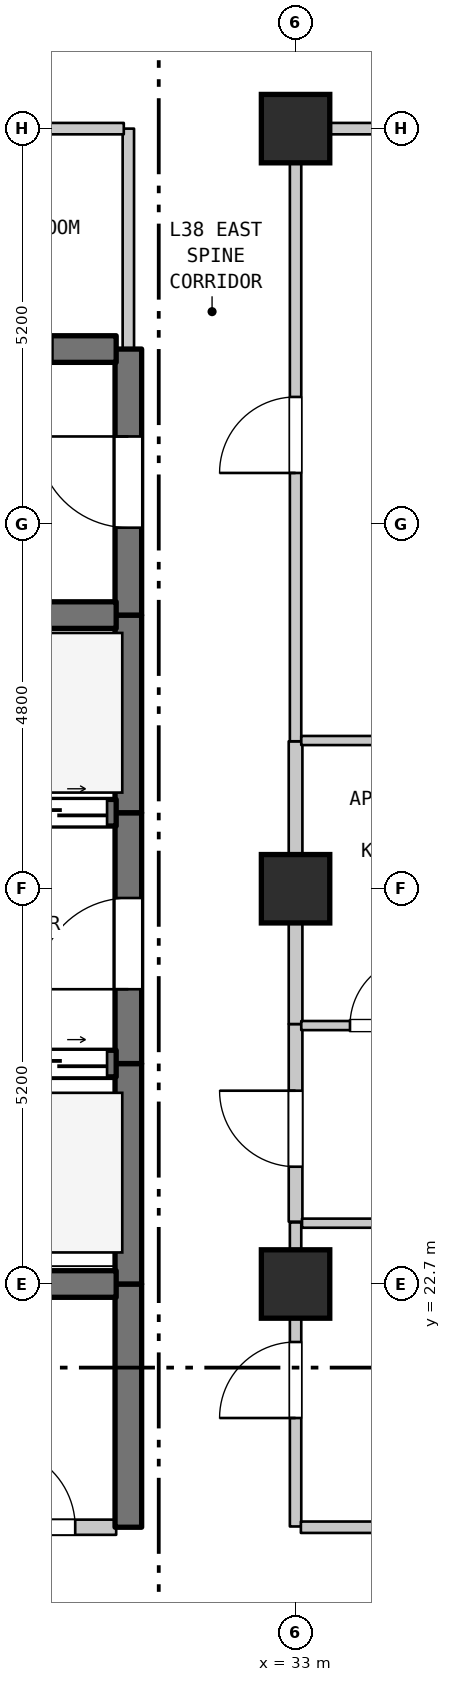
"""IFC4 building model, lengths in metres.
Left out: names, types, materials, properties, quantities, classifications, styles, units other than length and angle.
Written with IfcOpenShell. Run it as: python <this file> out.ifc"""

import sys

from ifc_helpers import new_model, si_unit, direction, frame, frame_2d, origin, origin_2d, place, context, subcontext, project, spatial, rectangle, extrude, element, fill, save


model = new_model("IFC4")
c1 = context("Model", 3, precision=1e-05, world=origin(), true_north=direction((0.0, 1.0)))
c2 = subcontext(c1, "Body", "Model", "MODEL_VIEW")
j1 = project(units=[si_unit("LENGTHUNIT", "METRE"), si_unit("PLANEANGLEUNIT", "RADIAN")], contexts=[c1])
p1 = place(None, origin())
s1 = spatial("IfcSite", under=j1, at=p1, CompositionType="ELEMENT")
p2 = place(p1, origin())
s2 = spatial("IfcBuilding", under=s1, at=p2, CompositionType="ELEMENT")
p3 = place(p2, frame((0.0, 0.0, 155.7)))
s3 = spatial("IfcBuildingStorey", under=s2, at=p3, CompositionType="ELEMENT", Elevation=155.7)
for number, where, z_axis, x_axis in (
    (1, (33.0, 22.7, 0.0), (0.0, 0.0, 1.0), (1.0, 0.0, 0.0)),
    (2, (33.0, 27.9, 0.0), (0.0, 0.0, 1.0), (1.0, 0.0, 0.0)),
    (3, (33.0, 37.9, 0.0), (0.0, 0.0, 1.0), (1.0, 0.0, 0.0)),
):
    element("IfcColumn", number, at=place(p3, frame(where, z_axis=z_axis, x_axis=x_axis)), inside=s3, PredefinedType="COLUMN", context=c2, shape_type="SweptSolid", body=[
        extrude(rectangle(XDim=0.9, YDim=0.9, at=origin_2d()), origin(), (0.0, 0.0, 1.0), 3.7),
    ])
p4 = place(p3, frame((30.8, 19.5, 0.0), z_axis=(0.0, 0.0, 1.0), x_axis=(0.0, 1.0, 0.0)))
e4 = element("IfcWall", 4, at=p4, inside=s3, PredefinedType="SHEAR", context=c2, shape_type="SweptSolid", body=[
    extrude(rectangle(XDim=3.2, YDim=0.35, at=frame_2d((1.6, 0.0))), origin(), (0.0, 0.0, 1.0), 3.28),
])
p5 = place(p3, frame((30.8, 22.7, 0.0), z_axis=(0.0, 0.0, 1.0), x_axis=(0.0, 1.0, 0.0)))
e5 = element("IfcWall", 5, at=p5, inside=s3, PredefinedType="SHEAR", context=c2, shape_type="SweptSolid", body=[
    extrude(rectangle(XDim=2.9, YDim=0.35, at=frame_2d((1.45, 0.0))), origin(), (0.0, 0.0, 1.0), 3.28),
])
p6 = place(p3, frame((30.8, 25.6, 0.0), z_axis=(0.0, 0.0, 1.0), x_axis=(0.0, 1.0, 0.0)))
e6 = element("IfcWall", 6, at=p6, inside=s3, PredefinedType="SHEAR", context=c2, shape_type="SweptSolid", body=[
    extrude(rectangle(XDim=3.3, YDim=0.35, at=frame_2d((1.65, 0.0))), origin(), (0.0, 0.0, 1.0), 3.28),
])
p7 = place(p6, frame((0.978, 0.0, 0.0)))
e7 = element("IfcOpeningElement", 7, at=p7, cuts=e6, PredefinedType="OPENING", context=c2, shape_type="SweptSolid", body=[
    extrude(rectangle(XDim=1.2, YDim=2.2, at=frame_2d((0.6, 1.1))), frame((0.0, 0.185, 0.0), z_axis=(0.0, -1.0, 0.0), x_axis=(1.0, 0.0, 0.0)), (0.0, 0.0, 1.0), 0.37),
])
p8 = place(p3, frame((30.8, 28.9, 0.0), z_axis=(0.0, 0.0, 1.0), x_axis=(0.0, 1.0, 0.0)))
e8 = element("IfcWall", 8, at=p8, inside=s3, PredefinedType="SHEAR", context=c2, shape_type="SweptSolid", body=[
    extrude(rectangle(XDim=2.6, YDim=0.35, at=frame_2d((1.3, 0.0))), origin(), (0.0, 0.0, 1.0), 3.28),
])
p9 = place(p3, frame((30.8, 31.5, 0.0), z_axis=(0.0, 0.0, 1.0), x_axis=(0.0, 1.0, 0.0)))
e9 = element("IfcWall", 9, at=p9, inside=s3, PredefinedType="SHEAR", context=c2, shape_type="SweptSolid", body=[
    extrude(rectangle(XDim=3.5, YDim=0.35, at=frame_2d((1.75, 0.0))), origin(), (0.0, 0.0, 1.0), 3.28),
])
p10 = place(p9, frame((1.15, 0.0, 0.0)))
e10 = element("IfcOpeningElement", 10, at=p10, cuts=e9, PredefinedType="OPENING", context=c2, shape_type="SweptSolid", body=[
    extrude(rectangle(XDim=1.2, YDim=2.2, at=frame_2d((0.6, 1.1))), frame((0.0, 0.185, 0.0), z_axis=(0.0, -1.0, 0.0), x_axis=(1.0, 0.0, 0.0)), (0.0, 0.0, 1.0), 0.37),
])
p11 = place(p3, frame((30.8, 35.0, 0.0), z_axis=(0.0, 0.0, 1.0), x_axis=(0.0, 1.0, 0.0)))
e11 = element("IfcWall", 11, at=p11, inside=s3, PredefinedType="STANDARD", context=c2, shape_type="SweptSolid", body=[
    extrude(rectangle(XDim=2.9, YDim=0.15, at=frame_2d((1.45, 0.0))), origin(), (0.0, 0.0, 1.0), 3.28),
])
p12 = place(p3, frame((33.0, 19.51, 0.0), z_axis=(0.0, 0.0, 1.0), x_axis=(0.0, 1.0, 0.0)))
e12 = element("IfcWall", 12, at=p12, inside=s3, PredefinedType="STANDARD", context=c2, shape_type="SweptSolid", body=[
    extrude(rectangle(XDim=4.0, YDim=0.15, at=frame_2d((2.0, 0.0))), origin(), (0.0, 0.0, 1.0), 2.78),
])
p13 = place(p12, frame((1.427, 0.0, 0.0)))
e13 = element("IfcOpeningElement", 13, at=p13, cuts=e12, PredefinedType="OPENING", context=c2, shape_type="SweptSolid", body=[
    extrude(rectangle(XDim=1.0, YDim=2.15, at=frame_2d((0.5, 1.075))), frame((0.0, 0.085, 0.0), z_axis=(0.0, -1.0, 0.0), x_axis=(1.0, 0.0, 0.0)), (0.0, 0.0, 1.0), 0.17),
])
p14 = place(p3, frame((33.0, 23.52, 0.0), z_axis=(0.0, 0.0, 1.0), x_axis=(0.0, 1.0, 0.0)))
e14 = element("IfcWall", 14, at=p14, inside=s3, PredefinedType="STANDARD", context=c2, shape_type="SweptSolid", body=[
    extrude(rectangle(XDim=2.6, YDim=0.18, at=frame_2d((1.3, 0.0))), origin(), (0.0, 0.0, 1.0), 2.78),
])
p15 = place(p14, frame((0.723, 0.0, 0.0)))
e15 = element("IfcOpeningElement", 15, at=p15, cuts=e14, PredefinedType="OPENING", context=c2, shape_type="SweptSolid", body=[
    extrude(rectangle(XDim=1.0, YDim=2.15, at=frame_2d((0.5, 1.075))), frame((0.0, 0.1, 0.0), z_axis=(0.0, -1.0, 0.0), x_axis=(1.0, 0.0, 0.0)), (0.0, 0.0, 1.0), 0.2),
])
p16 = place(p3, frame((33.0, 26.12, 0.0), z_axis=(0.0, 0.0, 1.0), x_axis=(0.0, 1.0, 0.0)))
e16 = element("IfcWall", 16, at=p16, inside=s3, PredefinedType="STANDARD", context=c2, shape_type="SweptSolid", body=[
    extrude(rectangle(XDim=3.72, YDim=0.18, at=frame_2d((1.86, 0.0))), origin(), (0.0, 0.0, 1.0), 2.78),
])
p17 = place(p3, frame((33.0, 29.84, 0.0), z_axis=(0.0, 0.0, 1.0), x_axis=(0.0, 1.0, 0.0)))
e17 = element("IfcWall", 17, at=p17, inside=s3, PredefinedType="STANDARD", context=c2, shape_type="SweptSolid", body=[
    extrude(rectangle(XDim=8.06, YDim=0.15, at=frame_2d((4.03, 0.0))), origin(), (0.0, 0.0, 1.0), 2.78),
])
p18 = place(p17, frame((3.53, 0.0, 0.0)))
e18 = element("IfcOpeningElement", 18, at=p18, cuts=e17, PredefinedType="OPENING", context=c2, shape_type="SweptSolid", body=[
    extrude(rectangle(XDim=1.0, YDim=2.15, at=frame_2d((0.5, 1.075))), frame((0.0, 0.085, 0.0), z_axis=(0.0, -1.0, 0.0), x_axis=(1.0, 0.0, 0.0)), (0.0, 0.0, 1.0), 0.17),
])
p19 = place(p3, frame((28.585, 19.5, 0.0), z_axis=(0.0, 0.0, 1.0), x_axis=(1.0, 0.0, 0.0)))
e19 = element("IfcWall", 19, at=p19, inside=s3, PredefinedType="STANDARD", context=c2, shape_type="SweptSolid", body=[
    extrude(rectangle(XDim=2.055, YDim=0.2, at=frame_2d((1.027, 0.0))), origin(), (0.0, 0.0, 1.0), 3.28),
])
p20 = place(p19, frame((0.466, 0.0, 0.0)))
e20 = element("IfcOpeningElement", 20, at=p20, cuts=e19, PredefinedType="OPENING", context=c2, shape_type="SweptSolid", body=[
    extrude(rectangle(XDim=1.05, YDim=2.15, at=frame_2d((0.525, 1.075))), frame((0.0, 0.11, 0.0), z_axis=(0.0, -1.0, 0.0), x_axis=(1.0, 0.0, 0.0)), (0.0, 0.0, 1.0), 0.22),
])
p21 = place(p3, frame((33.07, 19.5, 0.0), z_axis=(0.0, 0.0, 1.0), x_axis=(1.0, 0.0, 0.0)))
e21 = element("IfcWall", 21, at=p21, inside=s3, PredefinedType="STANDARD", context=c2, shape_type="SweptSolid", body=[
    extrude(rectangle(XDim=21.51, YDim=0.15, at=frame_2d((10.755, 0.0))), origin(), (0.0, 0.0, 1.0), 3.28),
])
p22 = place(p21, frame((10.185, 0.0, 0.0)))
e22 = element("IfcOpeningElement", 22, at=p22, cuts=e21, PredefinedType="OPENING", context=c2, shape_type="SweptSolid", body=[
    extrude(rectangle(XDim=1.0, YDim=2.15, at=frame_2d((0.5, 1.075))), frame((0.0, 0.085, 0.0), z_axis=(0.0, -1.0, 0.0), x_axis=(1.0, 0.0, 0.0)), (0.0, 0.0, 1.0), 0.17),
])
p23 = place(p3, frame((28.585, 22.7, 0.0), z_axis=(0.0, 0.0, 1.0), x_axis=(1.0, 0.0, 0.0)))
e23 = element("IfcWall", 23, at=p23, inside=s3, PredefinedType="SHEAR", context=c2, shape_type="SweptSolid", body=[
    extrude(rectangle(XDim=2.055, YDim=0.35, at=frame_2d((1.027, 0.0))), origin(), (0.0, 0.0, 1.0), 3.28),
])
p24 = place(p3, frame((33.085, 23.5, 0.0), z_axis=(0.0, 0.0, 1.0), x_axis=(1.0, 0.0, 0.0)))
e24 = element("IfcWall", 24, at=p24, inside=s3, PredefinedType="PARTITIONING", context=c2, shape_type="SweptSolid", body=[
    extrude(rectangle(XDim=23.905, YDim=0.12, at=frame_2d((11.953, 0.0))), origin(), (0.0, 0.0, 1.0), 3.28),
])
p25 = place(p3, frame((27.46, 25.6, 0.0), z_axis=(0.0, 0.0, 1.0), x_axis=(1.0, 0.0, 0.0)))
e25 = element("IfcWall", 25, at=p25, inside=s3, PredefinedType="SHEAR", context=c2, shape_type="SweptSolid", body=[
    extrude(rectangle(XDim=3.18, YDim=0.35, at=frame_2d((1.59, 0.0))), origin(), (0.0, 0.0, 1.0), 3.28),
])
p26 = place(p25, frame((0.12, 0.0, 0.0)))
e26 = element("IfcOpeningElement", 26, at=p26, cuts=e25, PredefinedType="OPENING", context=c2, shape_type="SweptSolid", body=[
    extrude(rectangle(XDim=1.25, YDim=2.2, at=frame_2d((0.625, 1.1))), frame((0.0, 0.185, 0.0), z_axis=(0.0, -1.0, 0.0), x_axis=(1.0, 0.0, 0.0)), (0.0, 0.0, 1.0), 0.37),
])
p27 = place(p25, frame((1.81, 0.0, 0.0)))
e27 = element("IfcOpeningElement", 27, at=p27, cuts=e25, PredefinedType="OPENING", context=c2, shape_type="SweptSolid", body=[
    extrude(rectangle(XDim=1.25, YDim=2.2, at=frame_2d((0.625, 1.1))), frame((0.0, 0.185, 0.0), z_axis=(0.0, -1.0, 0.0), x_axis=(1.0, 0.0, 0.0)), (0.0, 0.0, 1.0), 0.37),
])
p28 = place(p3, frame((33.075, 26.1, 0.0), z_axis=(0.0, 0.0, 1.0), x_axis=(1.0, 0.0, 0.0)))
e28 = element("IfcWall", 28, at=p28, inside=s3, PredefinedType="PARTITIONING", context=c2, shape_type="SweptSolid", body=[
    extrude(rectangle(XDim=2.364, YDim=0.12, at=frame_2d((1.182, 0.0))), origin(), (0.0, 0.0, 1.0), 3.28),
])
p29 = place(p28, frame((0.641, 0.0, 0.0)))
e29 = element("IfcOpeningElement", 29, at=p29, cuts=e28, PredefinedType="OPENING", context=c2, shape_type="SweptSolid", body=[
    extrude(rectangle(XDim=0.9, YDim=2.15, at=frame_2d((0.45, 1.075))), frame((0.0, 0.07, 0.0), z_axis=(0.0, -1.0, 0.0), x_axis=(1.0, 0.0, 0.0)), (0.0, 0.0, 1.0), 0.14),
])
p30 = place(p3, frame((27.46, 28.9, 0.0), z_axis=(0.0, 0.0, 1.0), x_axis=(1.0, 0.0, 0.0)))
e30 = element("IfcWall", 30, at=p30, inside=s3, PredefinedType="SHEAR", context=c2, shape_type="SweptSolid", body=[
    extrude(rectangle(XDim=3.18, YDim=0.35, at=frame_2d((1.59, 0.0))), origin(), (0.0, 0.0, 1.0), 3.28),
])
p31 = place(p30, frame((0.12, 0.0, 0.0)))
e31 = element("IfcOpeningElement", 31, at=p31, cuts=e30, PredefinedType="OPENING", context=c2, shape_type="SweptSolid", body=[
    extrude(rectangle(XDim=1.25, YDim=2.2, at=frame_2d((0.625, 1.1))), frame((0.0, 0.185, 0.0), z_axis=(0.0, -1.0, 0.0), x_axis=(1.0, 0.0, 0.0)), (0.0, 0.0, 1.0), 0.37),
])
p32 = place(p30, frame((1.81, 0.0, 0.0)))
e32 = element("IfcOpeningElement", 32, at=p32, cuts=e30, PredefinedType="OPENING", context=c2, shape_type="SweptSolid", body=[
    extrude(rectangle(XDim=1.25, YDim=2.2, at=frame_2d((0.625, 1.1))), frame((0.0, 0.185, 0.0), z_axis=(0.0, -1.0, 0.0), x_axis=(1.0, 0.0, 0.0)), (0.0, 0.0, 1.0), 0.37),
])
p33 = place(p3, frame((33.075, 29.85, 0.0), z_axis=(0.0, 0.0, 1.0), x_axis=(1.0, 0.0, 0.0)))
e33 = element("IfcWall", 33, at=p33, inside=s3, PredefinedType="PARTITIONING", context=c2, shape_type="SweptSolid", body=[
    extrude(rectangle(XDim=2.364, YDim=0.12, at=frame_2d((1.182, 0.0))), origin(), (0.0, 0.0, 1.0), 3.28),
])
p34 = place(p3, frame((27.46, 31.5, 0.0), z_axis=(0.0, 0.0, 1.0), x_axis=(1.0, 0.0, 0.0)))
e34 = element("IfcWall", 34, at=p34, inside=s3, PredefinedType="SHEAR", context=c2, shape_type="SweptSolid", body=[
    extrude(rectangle(XDim=3.18, YDim=0.35, at=frame_2d((1.59, 0.0))), origin(), (0.0, 0.0, 1.0), 3.28),
])
p35 = place(p3, frame((28.045, 35.0, 0.0), z_axis=(0.0, 0.0, 1.0), x_axis=(1.0, 0.0, 0.0)))
e35 = element("IfcWall", 35, at=p35, inside=s3, PredefinedType="SHEAR", context=c2, shape_type="SweptSolid", body=[
    extrude(rectangle(XDim=2.595, YDim=0.35, at=frame_2d((1.297, 0.0))), origin(), (0.0, 0.0, 1.0), 3.28),
])
p36 = place(p35, frame((0.806, 0.0, 0.0)))
e36 = element("IfcOpeningElement", 36, at=p36, cuts=e35, PredefinedType="OPENING", context=c2, shape_type="SweptSolid", body=[
    extrude(rectangle(XDim=0.95, YDim=2.15, at=frame_2d((0.475, 1.075))), frame((0.0, 0.185, 0.0), z_axis=(0.0, -1.0, 0.0), x_axis=(1.0, 0.0, 0.0)), (0.0, 0.0, 1.0), 0.37),
])
p37 = place(p3, frame((28.045, 37.9, 0.0), z_axis=(0.0, 0.0, 1.0), x_axis=(1.0, 0.0, 0.0)))
e37 = element("IfcWall", 37, at=p37, inside=s3, PredefinedType="STANDARD", context=c2, shape_type="SweptSolid", body=[
    extrude(rectangle(XDim=2.695, YDim=0.15, at=frame_2d((1.348, 0.0))), origin(), (0.0, 0.0, 1.0), 2.68),
])
p38 = place(p3, frame((33.06, 37.9, 0.0), z_axis=(0.0, 0.0, 1.0), x_axis=(1.0, 0.0, 0.0)))
e38 = element("IfcWall", 38, at=p38, inside=s3, PredefinedType="STANDARD", context=c2, shape_type="SweptSolid", body=[
    extrude(rectangle(XDim=11.879, YDim=0.15, at=frame_2d((5.939, 0.0))), origin(), (0.0, 0.0, 1.0), 3.28),
])
p39 = place(p38, frame((5.439, 0.0, 0.0)))
e39 = element("IfcOpeningElement", 39, at=p39, cuts=e38, PredefinedType="OPENING", context=c2, shape_type="SweptSolid", body=[
    extrude(rectangle(XDim=1.0, YDim=2.15, at=frame_2d((0.5, 1.075))), frame((0.0, 0.085, 0.0), z_axis=(0.0, -1.0, 0.0), x_axis=(1.0, 0.0, 0.0)), (0.0, 0.0, 1.0), 0.17),
])
p40 = place(p7, origin())
e40 = element("IfcDoor", 40, at=p40, inside=s3, OperationType="SINGLE_SWING_LEFT", PredefinedType="DOOR", context=c2, shape_type="SweptSolid", body=[
    extrude(rectangle(XDim=1.2, YDim=2.2, at=frame_2d((0.6, 1.1))), frame((0.0, 0.025, 0.0), z_axis=(0.0, -1.0, 0.0), x_axis=(1.0, 0.0, 0.0)), (0.0, 0.0, 1.0), 0.05),
])
fill(e7, e40)
p41 = place(p10, origin())
e41 = element("IfcDoor", 41, at=p41, inside=s3, OperationType="SINGLE_SWING_RIGHT", PredefinedType="DOOR", context=c2, shape_type="SweptSolid", body=[
    extrude(rectangle(XDim=1.2, YDim=2.2, at=frame_2d((0.6, 1.1))), frame((0.0, 0.025, 0.0), z_axis=(0.0, -1.0, 0.0), x_axis=(1.0, 0.0, 0.0)), (0.0, 0.0, 1.0), 0.05),
])
fill(e10, e41)
p42 = place(p13, origin())
e42 = element("IfcDoor", 42, at=p42, inside=s3, OperationType="SINGLE_SWING_LEFT", PredefinedType="DOOR", context=c2, shape_type="SweptSolid", body=[
    extrude(rectangle(XDim=1.0, YDim=2.15, at=frame_2d((0.5, 1.075))), frame((0.0, 0.025, 0.0), z_axis=(0.0, -1.0, 0.0), x_axis=(1.0, 0.0, 0.0)), (0.0, 0.0, 1.0), 0.05),
])
fill(e13, e42)
p43 = place(p15, origin())
e43 = element("IfcDoor", 43, at=p43, inside=s3, OperationType="SINGLE_SWING_RIGHT", PredefinedType="DOOR", context=c2, shape_type="SweptSolid", body=[
    extrude(rectangle(XDim=1.0, YDim=2.15, at=frame_2d((0.5, 1.075))), frame((0.0, 0.025, 0.0), z_axis=(0.0, -1.0, 0.0), x_axis=(1.0, 0.0, 0.0)), (0.0, 0.0, 1.0), 0.05),
])
fill(e15, e43)
p44 = place(p18, origin())
e44 = element("IfcDoor", 44, at=p44, inside=s3, OperationType="SINGLE_SWING_LEFT", PredefinedType="DOOR", context=c2, shape_type="SweptSolid", body=[
    extrude(rectangle(XDim=1.0, YDim=2.15, at=frame_2d((0.5, 1.075))), frame((0.0, 0.025, 0.0), z_axis=(0.0, -1.0, 0.0), x_axis=(1.0, 0.0, 0.0)), (0.0, 0.0, 1.0), 0.05),
])
fill(e18, e44)
p45 = place(p20, origin())
e45 = element("IfcDoor", 45, at=p45, inside=s3, OperationType="SINGLE_SWING_LEFT", PredefinedType="DOOR", context=c2, shape_type="SweptSolid", body=[
    extrude(rectangle(XDim=1.05, YDim=2.15, at=frame_2d((0.525, 1.075))), frame((0.0, 0.025, 0.0), z_axis=(0.0, -1.0, 0.0), x_axis=(1.0, 0.0, 0.0)), (0.0, 0.0, 1.0), 0.05),
])
fill(e20, e45)
p46 = place(p27, origin())
e46 = element("IfcDoor", 46, at=p46, inside=s3, OperationType="DOUBLE_DOOR_SLIDING", PredefinedType="DOOR", context=c2, shape_type="SweptSolid", body=[
    extrude(rectangle(XDim=1.25, YDim=2.2, at=frame_2d((0.625, 1.1))), frame((0.0, 0.025, 0.0), z_axis=(0.0, -1.0, 0.0), x_axis=(1.0, 0.0, 0.0)), (0.0, 0.0, 1.0), 0.05),
])
fill(e27, e46)
p47 = place(p29, origin())
e47 = element("IfcDoor", 47, at=p47, inside=s3, OperationType="SINGLE_SWING_RIGHT", PredefinedType="DOOR", context=c2, shape_type="SweptSolid", body=[
    extrude(rectangle(XDim=0.9, YDim=2.15, at=frame_2d((0.45, 1.075))), frame((0.0, 0.025, 0.0), z_axis=(0.0, -1.0, 0.0), x_axis=(1.0, 0.0, 0.0)), (0.0, 0.0, 1.0), 0.05),
])
fill(e29, e47)
p48 = place(p32, origin())
e48 = element("IfcDoor", 48, at=p48, inside=s3, OperationType="DOUBLE_DOOR_SLIDING", PredefinedType="DOOR", context=c2, shape_type="SweptSolid", body=[
    extrude(rectangle(XDim=1.25, YDim=2.2, at=frame_2d((0.625, 1.1))), frame((0.0, 0.025, 0.0), z_axis=(0.0, -1.0, 0.0), x_axis=(1.0, 0.0, 0.0)), (0.0, 0.0, 1.0), 0.05),
])
fill(e32, e48)
p49 = place(p36, frame((0.95, 0.0, 0.0), z_axis=(0.0, 0.0, 1.0), x_axis=(-1.0, 0.0, 0.0)))
e49 = element("IfcDoor", 49, at=p49, inside=s3, OperationType="SINGLE_SWING_LEFT", PredefinedType="DOOR", context=c2, shape_type="SweptSolid", body=[
    extrude(rectangle(XDim=0.95, YDim=2.15, at=frame_2d((0.475, 1.075))), frame((0.0, 0.025, 0.0), z_axis=(0.0, -1.0, 0.0), x_axis=(1.0, 0.0, 0.0)), (0.0, 0.0, 1.0), 0.05),
])
fill(e36, e49)
save(model, sys.argv[1])
